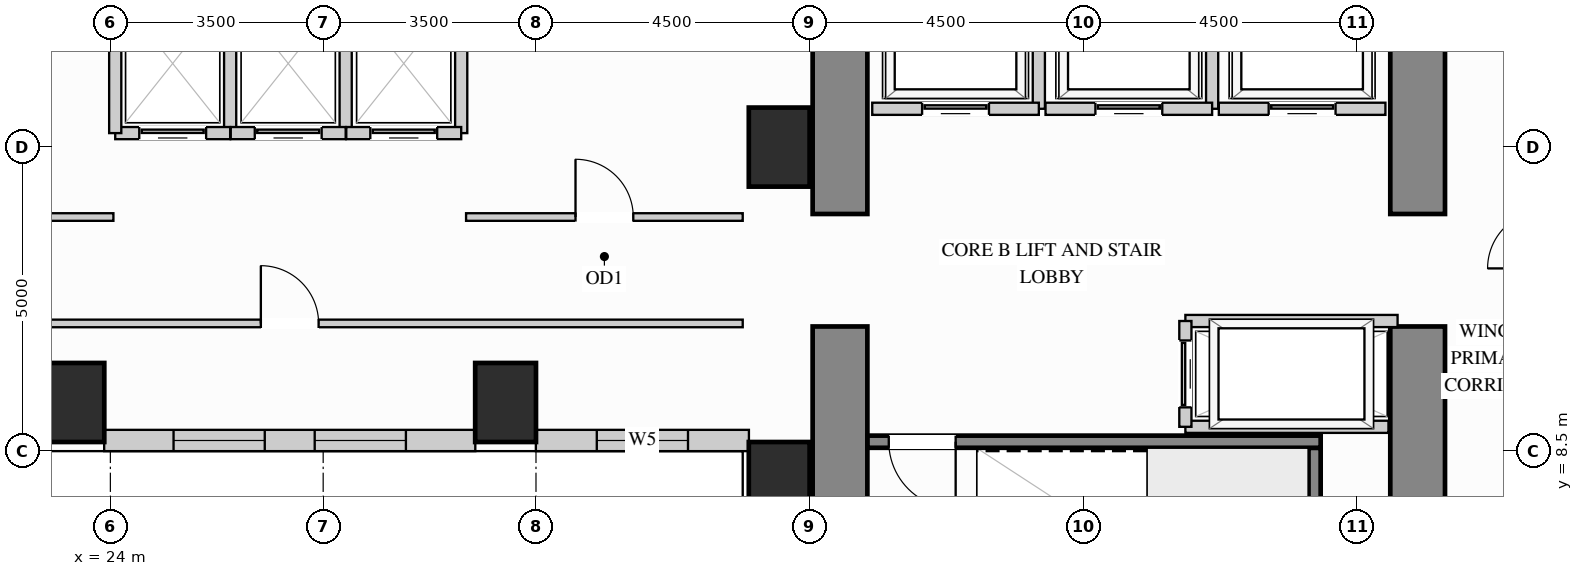
"""IFC4 building model, lengths in metres.
Left out: names, types, materials, properties, quantities, classifications, styles, units other than length and angle.
Written with IfcOpenShell. Run it as: python <this file> out.ifc"""

import sys

from ifc_helpers import new_model, si_unit, direction, frame, frame_2d, origin, origin_2d, place, context, subcontext, project, spatial, rectangle, extrude, source, transform, mapped, element, fill, save


model = new_model("IFC4")
c1 = context("Model", 3, precision=1e-05, world=origin(), true_north=direction((0.0, 1.0)))
c2 = subcontext(c1, "Body", "Model", "MODEL_VIEW")
j1 = project(units=[si_unit("LENGTHUNIT", "METRE"), si_unit("PLANEANGLEUNIT", "RADIAN")], contexts=[c1])
p1 = place(None, origin())
s1 = spatial("IfcSite", under=j1, at=p1, CompositionType="ELEMENT")
p2 = place(p1, origin())
s2 = spatial("IfcBuilding", under=s1, at=p2, CompositionType="ELEMENT")
p3 = place(p2, frame((0.0, 0.0, 22.5)))
s3 = spatial("IfcBuildingStorey", under=s2, at=p3, CompositionType="ELEMENT", Elevation=22.5)
m1 = source(origin(), c2, "Body", "SweptSolid", [
    extrude(rectangle(XDim=1.0, YDim=1.3, at=origin_2d()), origin(), (0.0, 0.0, 1.0), 3.38),
])
for number, where, z_axis, x_axis in (
    (1, (35.0, 13.5, 0.0), (0.0, 0.0, 1.0), (1.0, 0.0, 0.0)),
    (2, (35.0, 8.0, 0.0), (0.0, 0.0, 1.0), (1.0, 0.0, 0.0)),
    (3, (23.4, 9.3, 0.0), (0.0, 0.0, 1.0), (1.0, 0.0, 0.0)),
    (4, (30.5, 9.3, 0.0), (0.0, 0.0, 1.0), (1.0, 0.0, 0.0)),
):
    element("IfcColumn", number, at=place(p3, frame(where, z_axis=z_axis, x_axis=x_axis)), inside=s3, PredefinedType="COLUMN", context=c2, shape_type="MappedRepresentation", body=[
        mapped(m1, transform((0.0, 0.0, 0.0), x_axis=(1.0, 0.0, 0.0), y_axis=(0.0, 1.0, 0.0), z_axis=(0.0, 0.0, 1.0))),
    ])
m2 = source(origin(), c2, "Body", "SweptSolid", [
    extrude(rectangle(XDim=5.6, YDim=0.9, at=frame_2d((2.8, 0.0))), origin(), (0.0, 0.0, 1.0), 3.38),
])
p4 = place(p3, frame((45.5, 4.95, 0.0), z_axis=(0.0, 0.0, 1.0), x_axis=(0.0, 1.0, 0.0)))
e5 = element("IfcWall", 5, at=p4, inside=s3, PredefinedType="SHEAR", context=c2, shape_type="MappedRepresentation", body=[
    mapped(m2, transform((0.0, 0.0, 0.0), x_axis=(1.0, 0.0, 0.0), y_axis=(0.0, 1.0, 0.0), z_axis=(0.0, 0.0, 1.0))),
])
m3 = source(origin(), c2, "Body", "SweptSolid", [
    extrude(rectangle(XDim=3.65, YDim=0.9, at=frame_2d((1.825, 0.0))), origin(), (0.0, 0.0, 1.0), 3.38),
])
p5 = place(p3, frame((45.5, 12.4, 0.0), z_axis=(0.0, 0.0, 1.0), x_axis=(0.0, 1.0, 0.0)))
e6 = element("IfcWall", 6, at=p5, inside=s3, PredefinedType="SHEAR", context=c2, shape_type="MappedRepresentation", body=[
    mapped(m3, transform((0.0, 0.0, 0.0), x_axis=(1.0, 0.0, 0.0), y_axis=(0.0, 1.0, 0.0), z_axis=(0.0, 0.0, 1.0))),
])
p6 = place(p3, frame((36.0, 4.95, 0.0), z_axis=(0.0, 0.0, 1.0), x_axis=(0.0, 1.0, 0.0)))
e7 = element("IfcWall", 7, at=p6, inside=s3, PredefinedType="SHEAR", context=c2, shape_type="MappedRepresentation", body=[
    mapped(m2, transform((0.0, 0.0, 0.0), x_axis=(1.0, 0.0, 0.0), y_axis=(0.0, 1.0, 0.0), z_axis=(0.0, 0.0, 1.0))),
])
p7 = place(p3, frame((36.0, 12.4, 0.0), z_axis=(0.0, 0.0, 1.0), x_axis=(0.0, 1.0, 0.0)))
e8 = element("IfcWall", 8, at=p7, inside=s3, PredefinedType="SHEAR", context=c2, shape_type="MappedRepresentation", body=[
    mapped(m3, transform((0.0, 0.0, 0.0), x_axis=(1.0, 0.0, 0.0), y_axis=(0.0, 1.0, 0.0), z_axis=(0.0, 0.0, 1.0))),
])
p8 = place(p3, frame((23.898, 8.675, 0.0), z_axis=(0.0, 0.0, 1.0), x_axis=(1.0, 0.0, 0.0)))
e9 = element("IfcWall", 9, at=p8, inside=s3, PredefinedType="SOLIDWALL", context=c2, shape_type="SweptSolid", body=[
    extrude(rectangle(XDim=6.104, YDim=0.35, at=frame_2d((3.052, 0.0))), origin(), (0.0, 0.0, 1.0), 3.365),
])
p9 = place(p8, frame((1.141, 0.0, 0.78)))
e10 = element("IfcOpeningElement", 10, at=p9, cuts=e9, PredefinedType="OPENING", context=c2, shape_type="SweptSolid", body=[
    extrude(rectangle(XDim=1.5, YDim=2.0, at=frame_2d((0.75, 1.0))), frame((0.0, 0.185, 0.0), z_axis=(0.0, -1.0, 0.0), x_axis=(1.0, 0.0, 0.0)), (0.0, 0.0, 1.0), 0.37),
])
p10 = place(p8, frame((3.463, 0.0, 0.78)))
e11 = element("IfcOpeningElement", 11, at=p10, cuts=e9, PredefinedType="OPENING", context=c2, shape_type="SweptSolid", body=[
    extrude(rectangle(XDim=1.5, YDim=2.0, at=frame_2d((0.75, 1.0))), frame((0.0, 0.185, 0.0), z_axis=(0.0, -1.0, 0.0), x_axis=(1.0, 0.0, 0.0)), (0.0, 0.0, 1.0), 0.37),
])
p11 = place(p3, frame((30.998, 8.675, 0.0), z_axis=(0.0, 0.0, 1.0), x_axis=(1.0, 0.0, 0.0)))
e12 = element("IfcWall", 12, at=p11, inside=s3, PredefinedType="SOLIDWALL", context=c2, shape_type="SweptSolid", body=[
    extrude(rectangle(XDim=3.504, YDim=0.35, at=frame_2d((1.752, 0.0))), origin(), (0.0, 0.0, 1.0), 3.365),
])
p12 = place(p11, frame((1.002, 0.0, 0.78)))
e13 = element("IfcOpeningElement", 13, at=p12, cuts=e12, PredefinedType="OPENING", context=c2, shape_type="SweptSolid", body=[
    extrude(rectangle(XDim=1.5, YDim=2.0, at=frame_2d((0.75, 1.0))), frame((0.0, 0.185, 0.0), z_axis=(0.0, -1.0, 0.0), x_axis=(1.0, 0.0, 0.0)), (0.0, 0.0, 1.0), 0.37),
])
p13 = place(p3, frame((29.85, 12.35, 0.0), z_axis=(0.0, 0.0, 1.0), x_axis=(1.0, 0.0, 0.0)))
e14 = element("IfcWall", 14, at=p13, inside=s3, PredefinedType="PARTITIONING", context=c2, shape_type="SweptSolid", body=[
    extrude(rectangle(XDim=4.55, YDim=0.125, at=frame_2d((2.275, 0.0))), origin(), (0.0, 0.0, 1.0), 3.365),
])
p14 = place(p13, frame((1.8, 0.0, 0.0)))
e15 = element("IfcOpeningElement", 15, at=p14, cuts=e14, PredefinedType="OPENING", context=c2, shape_type="SweptSolid", body=[
    extrude(rectangle(XDim=0.95, YDim=2.15, at=frame_2d((0.475, 1.075))), frame((0.0, 0.073, 0.0), z_axis=(0.0, -1.0, 0.0), x_axis=(1.0, 0.0, 0.0)), (0.0, 0.0, 1.0), 0.145),
])
p15 = place(p3, frame((19.5, 12.35, 0.0), z_axis=(0.0, 0.0, 1.0), x_axis=(1.0, 0.0, 0.0)))
e16 = element("IfcWall", 16, at=p15, inside=s3, PredefinedType="PARTITIONING", context=c2, shape_type="SweptSolid", body=[
    extrude(rectangle(XDim=4.55, YDim=0.125, at=frame_2d((2.275, 0.0))), origin(), (0.0, 0.0, 1.0), 3.365),
])
p16 = place(p15, frame((1.8, 0.0, 0.0)))
e17 = element("IfcOpeningElement", 17, at=p16, cuts=e16, PredefinedType="OPENING", context=c2, shape_type="SweptSolid", body=[
    extrude(rectangle(XDim=0.95, YDim=2.15, at=frame_2d((0.475, 1.075))), frame((0.0, 0.073, 0.0), z_axis=(0.0, -1.0, 0.0), x_axis=(1.0, 0.0, 0.0)), (0.0, 0.0, 1.0), 0.145),
])
p17 = place(p3, frame((19.5, 10.6, 0.0), z_axis=(0.0, 0.0, 1.0), x_axis=(1.0, 0.0, 0.0)))
e18 = element("IfcWall", 18, at=p17, inside=s3, PredefinedType="PARTITIONING", context=c2, shape_type="SweptSolid", body=[
    extrude(rectangle(XDim=14.9, YDim=0.125, at=frame_2d((7.45, 0.0))), origin(), (0.0, 0.0, 1.0), 3.365),
])
p18 = place(p17, frame((6.975, 0.0, 0.0)))
e19 = element("IfcOpeningElement", 19, at=p18, cuts=e18, PredefinedType="OPENING", context=c2, shape_type="SweptSolid", body=[
    extrude(rectangle(XDim=0.95, YDim=2.15, at=frame_2d((0.475, 1.075))), frame((0.0, 0.073, 0.0), z_axis=(0.0, -1.0, 0.0), x_axis=(1.0, 0.0, 0.0)), (0.0, 0.0, 1.0), 0.145),
])
m4 = source(origin(), c2, "Body", "SweptSolid", [
    extrude(rectangle(XDim=1.89, YDim=0.2, at=frame_2d((0.945, 0.0))), origin(), (0.0, 0.0, 1.0), 3.365),
])
p19 = place(p3, frame((39.27, 14.13, 0.0), z_axis=(0.0, 0.0, 1.0), x_axis=(0.0, 1.0, 0.0)))
e20 = element("IfcWall", 20, at=p19, inside=s3, PredefinedType="PARTITIONING", context=c2, shape_type="MappedRepresentation", body=[
    mapped(m4, transform((0.0, 0.0, 0.0), x_axis=(1.0, 0.0, 0.0), y_axis=(0.0, 1.0, 0.0), z_axis=(0.0, 0.0, 1.0))),
])
p20 = place(p3, frame((36.53, 14.13, 0.0), z_axis=(0.0, 0.0, 1.0), x_axis=(1.0, 0.0, 0.0)))
e21 = element("IfcWall", 21, at=p20, inside=s3, PredefinedType="PARTITIONING", context=c2, shape_type="SweptSolid", body=[
    extrude(rectangle(XDim=2.74, YDim=0.2, at=frame_2d((1.37, 0.0))), origin(), (0.0, 0.0, 1.0), 3.365),
])
p21 = place(p20, frame((0.82, 0.0, 0.0)))
e22 = element("IfcOpeningElement", 22, at=p21, cuts=e21, PredefinedType="OPENING", context=c2, shape_type="SweptSolid", body=[
    extrude(rectangle(XDim=1.1, YDim=2.2, at=frame_2d((0.55, 1.1))), frame((0.0, 0.11, 0.0), z_axis=(0.0, -1.0, 0.0), x_axis=(1.0, 0.0, 0.0)), (0.0, 0.0, 1.0), 0.22),
])
p22 = place(p3, frame((42.12, 14.13, 0.0), z_axis=(0.0, 0.0, 1.0), x_axis=(0.0, 1.0, 0.0)))
e23 = element("IfcWall", 23, at=p22, inside=s3, PredefinedType="PARTITIONING", context=c2, shape_type="MappedRepresentation", body=[
    mapped(m4, transform((0.0, 0.0, 0.0), x_axis=(1.0, 0.0, 0.0), y_axis=(0.0, 1.0, 0.0), z_axis=(0.0, 0.0, 1.0))),
])
p23 = place(p3, frame((39.38, 14.13, 0.0), z_axis=(0.0, 0.0, 1.0), x_axis=(1.0, 0.0, 0.0)))
e24 = element("IfcWall", 24, at=p23, inside=s3, PredefinedType="PARTITIONING", context=c2, shape_type="SweptSolid", body=[
    extrude(rectangle(XDim=2.74, YDim=0.2, at=frame_2d((1.37, 0.0))), origin(), (0.0, 0.0, 1.0), 3.365),
])
p24 = place(p23, frame((0.82, 0.0, 0.0)))
e25 = element("IfcOpeningElement", 25, at=p24, cuts=e24, PredefinedType="OPENING", context=c2, shape_type="SweptSolid", body=[
    extrude(rectangle(XDim=1.1, YDim=2.2, at=frame_2d((0.55, 1.1))), frame((0.0, 0.11, 0.0), z_axis=(0.0, -1.0, 0.0), x_axis=(1.0, 0.0, 0.0)), (0.0, 0.0, 1.0), 0.22),
])
p25 = place(p3, frame((42.23, 14.13, 0.0), z_axis=(0.0, 0.0, 1.0), x_axis=(1.0, 0.0, 0.0)))
e26 = element("IfcWall", 26, at=p25, inside=s3, PredefinedType="PARTITIONING", context=c2, shape_type="SweptSolid", body=[
    extrude(rectangle(XDim=2.74, YDim=0.2, at=frame_2d((1.37, 0.0))), origin(), (0.0, 0.0, 1.0), 3.365),
])
p26 = place(p25, frame((0.82, 0.0, 0.0)))
e27 = element("IfcOpeningElement", 27, at=p26, cuts=e26, PredefinedType="OPENING", context=c2, shape_type="SweptSolid", body=[
    extrude(rectangle(XDim=1.1, YDim=2.2, at=frame_2d((0.55, 1.1))), frame((0.0, 0.11, 0.0), z_axis=(0.0, -1.0, 0.0), x_axis=(1.0, 0.0, 0.0)), (0.0, 0.0, 1.0), 0.22),
])
m5 = source(origin(), c2, "Body", "SweptSolid", [
    extrude(rectangle(XDim=2.29, YDim=0.2, at=frame_2d((1.145, 0.0))), origin(), (0.0, 0.0, 1.0), 3.365),
])
p27 = place(p3, frame((25.97, 13.73, 0.0), z_axis=(0.0, 0.0, 1.0), x_axis=(0.0, 1.0, 0.0)))
e28 = element("IfcWall", 28, at=p27, inside=s3, PredefinedType="PARTITIONING", context=c2, shape_type="MappedRepresentation", body=[
    mapped(m5, transform((0.0, 0.0, 0.0), x_axis=(1.0, 0.0, 0.0), y_axis=(0.0, 1.0, 0.0), z_axis=(0.0, 0.0, 1.0))),
])
p28 = place(p3, frame((24.08, 13.73, 0.0), z_axis=(0.0, 0.0, 1.0), x_axis=(1.0, 0.0, 0.0)))
e29 = element("IfcWall", 29, at=p28, inside=s3, PredefinedType="PARTITIONING", context=c2, shape_type="SweptSolid", body=[
    extrude(rectangle(XDim=1.89, YDim=0.2, at=frame_2d((0.945, 0.0))), origin(), (0.0, 0.0, 1.0), 2.446),
])
p29 = place(p28, frame((0.395, 0.0, 0.0)))
e30 = element("IfcOpeningElement", 30, at=p29, cuts=e29, PredefinedType="OPENING", context=c2, shape_type="SweptSolid", body=[
    extrude(rectangle(XDim=1.1, YDim=2.2, at=frame_2d((0.55, 1.1))), frame((0.0, 0.11, 0.0), z_axis=(0.0, -1.0, 0.0), x_axis=(1.0, 0.0, 0.0)), (0.0, 0.0, 1.0), 0.22),
])
for number, where, z_axis, x_axis in (
    (31, (24.08, 13.73, 0.0), (0.0, 0.0, 1.0), (0.0, 1.0, 0.0)),
    (32, (27.87, 13.73, 0.0), (0.0, 0.0, 1.0), (0.0, 1.0, 0.0)),
):
    element("IfcWall", number, at=place(p3, frame(where, z_axis=z_axis, x_axis=x_axis)), inside=s3, PredefinedType="PARTITIONING", context=c2, shape_type="MappedRepresentation", body=[
        mapped(m5, transform((0.0, 0.0, 0.0), x_axis=(1.0, 0.0, 0.0), y_axis=(0.0, 1.0, 0.0), z_axis=(0.0, 0.0, 1.0))),
    ])
p30 = place(p3, frame((25.98, 13.73, 0.0), z_axis=(0.0, 0.0, 1.0), x_axis=(1.0, 0.0, 0.0)))
e33 = element("IfcWall", 33, at=p30, inside=s3, PredefinedType="PARTITIONING", context=c2, shape_type="SweptSolid", body=[
    extrude(rectangle(XDim=1.89, YDim=0.2, at=frame_2d((0.945, 0.0))), origin(), (0.0, 0.0, 1.0), 2.446),
])
p31 = place(p30, frame((0.395, 0.0, 0.0)))
e34 = element("IfcOpeningElement", 34, at=p31, cuts=e33, PredefinedType="OPENING", context=c2, shape_type="SweptSolid", body=[
    extrude(rectangle(XDim=1.1, YDim=2.2, at=frame_2d((0.55, 1.1))), frame((0.0, 0.11, 0.0), z_axis=(0.0, -1.0, 0.0), x_axis=(1.0, 0.0, 0.0)), (0.0, 0.0, 1.0), 0.22),
])
p32 = place(p3, frame((29.77, 13.73, 0.0), z_axis=(0.0, 0.0, 1.0), x_axis=(0.0, 1.0, 0.0)))
e35 = element("IfcWall", 35, at=p32, inside=s3, PredefinedType="PARTITIONING", context=c2, shape_type="MappedRepresentation", body=[
    mapped(m5, transform((0.0, 0.0, 0.0), x_axis=(1.0, 0.0, 0.0), y_axis=(0.0, 1.0, 0.0), z_axis=(0.0, 0.0, 1.0))),
])
p33 = place(p3, frame((27.88, 13.73, 0.0), z_axis=(0.0, 0.0, 1.0), x_axis=(1.0, 0.0, 0.0)))
e36 = element("IfcWall", 36, at=p33, inside=s3, PredefinedType="PARTITIONING", context=c2, shape_type="SweptSolid", body=[
    extrude(rectangle(XDim=1.89, YDim=0.2, at=frame_2d((0.945, 0.0))), origin(), (0.0, 0.0, 1.0), 2.446),
])
p34 = place(p33, frame((0.395, 0.0, 0.0)))
e37 = element("IfcOpeningElement", 37, at=p34, cuts=e36, PredefinedType="OPENING", context=c2, shape_type="SweptSolid", body=[
    extrude(rectangle(XDim=1.1, YDim=2.2, at=frame_2d((0.55, 1.1))), frame((0.0, 0.11, 0.0), z_axis=(0.0, -1.0, 0.0), x_axis=(1.0, 0.0, 0.0)), (0.0, 0.0, 1.0), 0.22),
])
m6 = source(origin(), c2, "Body", "SweptSolid", [
    extrude(rectangle(XDim=3.49, YDim=0.2, at=frame_2d((1.745, 0.0))), origin(), (0.0, 0.0, 1.0), 3.365),
])
p35 = place(p3, frame((41.68, 10.64, 0.0), z_axis=(0.0, 0.0, 1.0), x_axis=(1.0, 0.0, 0.0)))
e38 = element("IfcWall", 38, at=p35, inside=s3, PredefinedType="PARTITIONING", context=c2, shape_type="MappedRepresentation", body=[
    mapped(m6, transform((0.0, 0.0, 0.0), x_axis=(1.0, 0.0, 0.0), y_axis=(0.0, 1.0, 0.0), z_axis=(0.0, 0.0, 1.0))),
])
m7 = source(origin(), c2, "Body", "SweptSolid", [
    extrude(rectangle(XDim=3.34, YDim=0.2, at=frame_2d((1.67, 0.0))), origin(), (0.0, 0.0, 1.0), 3.365),
])
p36 = place(p3, frame((41.68, 8.9, 0.0), z_axis=(0.0, 0.0, 1.0), x_axis=(1.0, 0.0, 0.0)))
e39 = element("IfcWall", 39, at=p36, inside=s3, PredefinedType="PARTITIONING", context=c2, shape_type="MappedRepresentation", body=[
    mapped(m7, transform((0.0, 0.0, 0.0), x_axis=(1.0, 0.0, 0.0), y_axis=(0.0, 1.0, 0.0), z_axis=(0.0, 0.0, 1.0))),
])
p37 = place(p3, frame((41.68, 8.9, 0.0), z_axis=(0.0, 0.0, 1.0), x_axis=(0.0, 1.0, 0.0)))
e40 = element("IfcWall", 40, at=p37, inside=s3, PredefinedType="PARTITIONING", context=c2, shape_type="SweptSolid", body=[
    extrude(rectangle(XDim=1.74, YDim=0.2, at=frame_2d((0.87, 0.0))), origin(), (0.0, 0.0, 1.0), 3.365),
])
p38 = place(p37, frame((0.32, 0.0, 0.0)))
e41 = element("IfcOpeningElement", 41, at=p38, cuts=e40, PredefinedType="OPENING", context=c2, shape_type="SweptSolid", body=[
    extrude(rectangle(XDim=1.1, YDim=2.2, at=frame_2d((0.55, 1.1))), frame((0.0, 0.11, 0.0), z_axis=(0.0, -1.0, 0.0), x_axis=(1.0, 0.0, 0.0)), (0.0, 0.0, 1.0), 0.22),
])
m8 = source(origin(), c2, "Body", "SweptSolid", [
    extrude(rectangle(XDim=3.603, YDim=0.2, at=frame_2d((1.802, 0.0))), origin(), (0.0, 0.0, 1.0), 3.38),
])
p39 = place(p3, frame((43.805, 4.952, 0.0), z_axis=(0.0, 0.0, 1.0), x_axis=(0.0, 1.0, 0.0)))
e42 = element("IfcWall", 42, at=p39, inside=s3, PredefinedType="SHEAR", context=c2, shape_type="MappedRepresentation", body=[
    mapped(m8, transform((0.0, 0.0, 0.0), x_axis=(1.0, 0.0, 0.0), y_axis=(0.0, 1.0, 0.0), z_axis=(0.0, 0.0, 1.0))),
])
p40 = place(p3, frame((36.452, 8.655, 0.0), z_axis=(0.0, 0.0, 1.0), x_axis=(1.0, 0.0, 0.0)))
e43 = element("IfcWall", 43, at=p40, inside=s3, PredefinedType="SHEAR", context=c2, shape_type="SweptSolid", body=[
    extrude(rectangle(XDim=7.453, YDim=0.2, at=frame_2d((3.727, 0.0))), origin(), (0.0, 0.0, 1.0), 3.38),
])
p41 = place(p40, frame((0.35, 0.0, 0.0)))
e44 = element("IfcOpeningElement", 44, at=p41, cuts=e43, PredefinedType="OPENING", context=c2, shape_type="SweptSolid", body=[
    extrude(rectangle(XDim=1.1, YDim=2.15, at=frame_2d((0.55, 1.075))), frame((0.0, 0.11, 0.0), z_axis=(0.0, -1.0, 0.0), x_axis=(1.0, 0.0, 0.0)), (0.0, 0.0, 1.0), 0.22),
])
m9 = source(origin(), c2, "Body", "SweptSolid", [
    extrude(rectangle(XDim=1.1, YDim=2.2, at=frame_2d((0.55, 1.1))), frame((0.0, 0.025, 0.0), z_axis=(0.0, -1.0, 0.0), x_axis=(1.0, 0.0, 0.0)), (0.0, 0.0, 1.0), 0.05),
])
p42 = place(p21, origin())
e45 = element("IfcDoor", 45, at=p42, inside=s3, OperationType="SLIDING_TO_LEFT", PredefinedType="DOOR", context=c2, shape_type="MappedRepresentation", body=[
    mapped(m9, transform((0.0, 0.0, 0.0), x_axis=(1.0, 0.0, 0.0), y_axis=(0.0, 1.0, 0.0), z_axis=(0.0, 0.0, 1.0))),
])
fill(e22, e45)
p43 = place(p24, origin())
e46 = element("IfcDoor", 46, at=p43, inside=s3, OperationType="SLIDING_TO_LEFT", PredefinedType="DOOR", context=c2, shape_type="MappedRepresentation", body=[
    mapped(m9, transform((0.0, 0.0, 0.0), x_axis=(1.0, 0.0, 0.0), y_axis=(0.0, 1.0, 0.0), z_axis=(0.0, 0.0, 1.0))),
])
fill(e25, e46)
p44 = place(p26, origin())
e47 = element("IfcDoor", 47, at=p44, inside=s3, OperationType="SLIDING_TO_LEFT", PredefinedType="DOOR", context=c2, shape_type="MappedRepresentation", body=[
    mapped(m9, transform((0.0, 0.0, 0.0), x_axis=(1.0, 0.0, 0.0), y_axis=(0.0, 1.0, 0.0), z_axis=(0.0, 0.0, 1.0))),
])
fill(e27, e47)
p45 = place(p29, origin())
e48 = element("IfcDoor", 48, at=p45, inside=s3, OperationType="SLIDING_TO_LEFT", PredefinedType="DOOR", context=c2, shape_type="MappedRepresentation", body=[
    mapped(m9, transform((0.0, 0.0, 0.0), x_axis=(1.0, 0.0, 0.0), y_axis=(0.0, 1.0, 0.0), z_axis=(0.0, 0.0, 1.0))),
])
fill(e30, e48)
p46 = place(p31, origin())
e49 = element("IfcDoor", 49, at=p46, inside=s3, OperationType="SLIDING_TO_LEFT", PredefinedType="DOOR", context=c2, shape_type="MappedRepresentation", body=[
    mapped(m9, transform((0.0, 0.0, 0.0), x_axis=(1.0, 0.0, 0.0), y_axis=(0.0, 1.0, 0.0), z_axis=(0.0, 0.0, 1.0))),
])
fill(e34, e49)
p47 = place(p34, origin())
e50 = element("IfcDoor", 50, at=p47, inside=s3, OperationType="SLIDING_TO_LEFT", PredefinedType="DOOR", context=c2, shape_type="MappedRepresentation", body=[
    mapped(m9, transform((0.0, 0.0, 0.0), x_axis=(1.0, 0.0, 0.0), y_axis=(0.0, 1.0, 0.0), z_axis=(0.0, 0.0, 1.0))),
])
fill(e37, e50)
p48 = place(p38, origin())
e51 = element("IfcDoor", 51, at=p48, inside=s3, OperationType="SLIDING_TO_LEFT", PredefinedType="DOOR", context=c2, shape_type="MappedRepresentation", body=[
    mapped(m9, transform((0.0, 0.0, 0.0), x_axis=(1.0, 0.0, 0.0), y_axis=(0.0, 1.0, 0.0), z_axis=(0.0, 0.0, 1.0))),
])
fill(e41, e51)
m10 = source(origin(), c2, "Body", "SweptSolid", [
    extrude(rectangle(XDim=0.95, YDim=2.15, at=frame_2d((0.475, 1.075))), frame((0.0, 0.025, 0.0), z_axis=(0.0, -1.0, 0.0), x_axis=(1.0, 0.0, 0.0)), (0.0, 0.0, 1.0), 0.05),
])
p49 = place(p14, origin())
e52 = element("IfcDoor", 52, at=p49, inside=s3, OperationType="SINGLE_SWING_LEFT", PredefinedType="DOOR", context=c2, shape_type="MappedRepresentation", body=[
    mapped(m10, transform((0.0, 0.0, 0.0), x_axis=(1.0, 0.0, 0.0), y_axis=(0.0, 1.0, 0.0), z_axis=(0.0, 0.0, 1.0))),
])
fill(e15, e52)
p50 = place(p18, origin())
e53 = element("IfcDoor", 53, at=p50, inside=s3, OperationType="SINGLE_SWING_LEFT", PredefinedType="DOOR", context=c2, shape_type="MappedRepresentation", body=[
    mapped(m10, transform((0.0, 0.0, 0.0), x_axis=(1.0, 0.0, 0.0), y_axis=(0.0, 1.0, 0.0), z_axis=(0.0, 0.0, 1.0))),
])
fill(e19, e53)
m11 = source(origin(), c2, "Body", "SweptSolid", [
    extrude(rectangle(XDim=1.1, YDim=2.15, at=frame_2d((0.55, 1.075))), frame((0.0, 0.025, 0.0), z_axis=(0.0, -1.0, 0.0), x_axis=(1.0, 0.0, 0.0)), (0.0, 0.0, 1.0), 0.05),
])
p51 = place(p41, origin())
e54 = element("IfcDoor", 54, at=p51, inside=s3, OperationType="SINGLE_SWING_RIGHT", PredefinedType="DOOR", context=c2, shape_type="MappedRepresentation", body=[
    mapped(m11, transform((0.0, 0.0, 0.0), x_axis=(1.0, 0.0, 0.0), y_axis=(0.0, 1.0, 0.0), z_axis=(0.0, 0.0, 1.0))),
])
fill(e44, e54)
m12 = source(origin(), c2, "Body", "SweptSolid", [
    extrude(rectangle(XDim=1.5, YDim=2.0, at=frame_2d((0.75, 1.0))), frame((0.0, 0.03, 0.0), z_axis=(0.0, -1.0, 0.0), x_axis=(1.0, 0.0, 0.0)), (0.0, 0.0, 1.0), 0.06),
])
p52 = place(p9, origin())
e55 = element("IfcWindow", 55, at=p52, inside=s3, PartitioningType="SINGLE_PANEL", PredefinedType="WINDOW", context=c2, shape_type="MappedRepresentation", body=[
    mapped(m12, transform((0.0, 0.0, 0.0), x_axis=(1.0, 0.0, 0.0), y_axis=(0.0, 1.0, 0.0), z_axis=(0.0, 0.0, 1.0))),
])
fill(e10, e55)
p53 = place(p10, origin())
e56 = element("IfcWindow", 56, at=p53, inside=s3, PartitioningType="SINGLE_PANEL", PredefinedType="WINDOW", context=c2, shape_type="MappedRepresentation", body=[
    mapped(m12, transform((0.0, 0.0, 0.0), x_axis=(1.0, 0.0, 0.0), y_axis=(0.0, 1.0, 0.0), z_axis=(0.0, 0.0, 1.0))),
])
fill(e11, e56)
p54 = place(p12, origin())
e57 = element("IfcWindow", 57, at=p54, inside=s3, PartitioningType="SINGLE_PANEL", PredefinedType="WINDOW", context=c2, shape_type="MappedRepresentation", body=[
    mapped(m12, transform((0.0, 0.0, 0.0), x_axis=(1.0, 0.0, 0.0), y_axis=(0.0, 1.0, 0.0), z_axis=(0.0, 0.0, 1.0))),
])
fill(e13, e57)
save(model, sys.argv[1])
